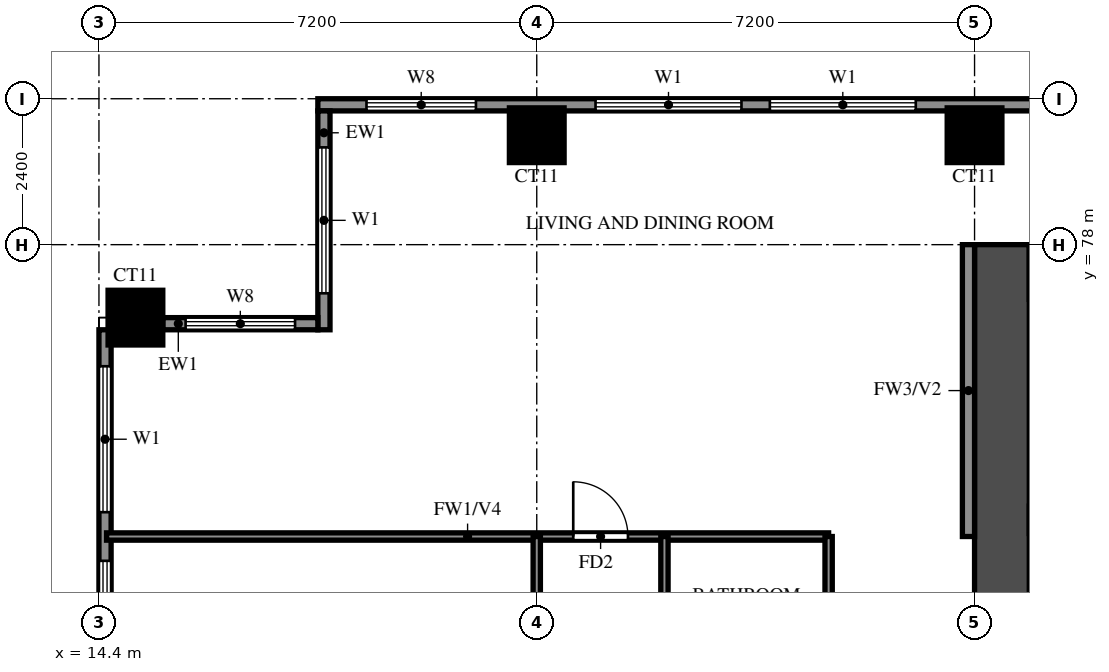
"""IFC4 building model, lengths in metres.
Left out: names, types, materials, properties, quantities, classifications, styles, units other than length and angle.
Written with IfcOpenShell. Run it as: python <this file> out.ifc"""

import sys

from ifc_helpers import new_model, si_unit, direction, frame, frame_2d, origin, origin_2d, place, context, subcontext, project, spatial, rectangle, extrude, source, transform, mapped, element, fill, save


model = new_model("IFC4")
c1 = context("Model", 3, precision=1e-05, world=origin(), true_north=direction((0.0, 1.0)))
c2 = subcontext(c1, "Body", "Model", "MODEL_VIEW")
j1 = project(units=[si_unit("LENGTHUNIT", "METRE"), si_unit("PLANEANGLEUNIT", "RADIAN")], contexts=[c1])
p1 = place(None, origin())
s1 = spatial("IfcSite", under=j1, at=p1, CompositionType="ELEMENT")
p2 = place(p1, origin())
s2 = spatial("IfcBuilding", under=s1, at=p2, CompositionType="ELEMENT")
p3 = place(p2, frame((0.0, 0.0, 93.5)))
s3 = spatial("IfcBuildingStorey", under=s2, at=p3, CompositionType="ELEMENT", Elevation=93.5)
m1 = source(origin(), c2, "Body", "SweptSolid", [
    extrude(rectangle(XDim=0.9, YDim=0.9, at=origin_2d()), origin(), (0.0, 0.0, 1.0), 3.18),
])
for number, where, z_axis, x_axis in (
    (1, (15.0, 76.8, 0.0), (0.0, 0.0, 1.0), (1.0, 0.0, 0.0)),
    (2, (21.6, 79.8, 0.0), (0.0, 0.0, 1.0), (1.0, 0.0, 0.0)),
    (3, (28.8, 79.8, 0.0), (0.0, 0.0, 1.0), (1.0, 0.0, 0.0)),
):
    element("IfcColumn", number, at=place(p3, frame(where, z_axis=z_axis, x_axis=x_axis)), inside=s3, PredefinedType="COLUMN", context=c2, shape_type="MappedRepresentation", body=[
        mapped(m1, transform((0.0, 0.0, 0.0))),
    ])
p4 = place(p3, frame((29.25, 66.0, 0.0), z_axis=(0.0, 0.0, 1.0), x_axis=(0.0, 1.0, 0.0)))
e4 = element("IfcWall", 4, at=p4, inside=s3, PredefinedType="SHEAR", context=c2, shape_type="SweptSolid", body=[
    extrude(rectangle(XDim=12.0, YDim=0.9, at=frame_2d((6.0, 0.0))), origin(), (0.0, 0.0, 1.0), 3.18),
])
p5 = place(p3, frame((29.7, 73.475, 0.0), z_axis=(0.0, 0.0, 1.0), x_axis=(1.0, 0.0, 0.0)))
e5 = element("IfcWall", 5, at=p5, inside=s3, PredefinedType="SHEAR", context=c2, shape_type="SweptSolid", body=[
    extrude(rectangle(XDim=3.175, YDim=0.45, at=frame_2d((1.587, 0.0))), origin(), (0.0, 0.0, 1.0), 3.18),
])
p6 = place(p3, frame((72.0, 80.3, 0.0), z_axis=(0.0, 0.0, 1.0), x_axis=(-1.0, 0.0, 0.0)))
e6 = element("IfcWall", 6, at=p6, inside=s3, PredefinedType="SOLIDWALL", context=c2, shape_type="SweptSolid", body=[
    extrude(rectangle(XDim=54.0, YDim=0.2, at=frame_2d((27.0, 0.0))), origin(), (0.0, 0.0, 1.0), 3.18),
])
p7 = place(p6, frame((44.167, 0.0, 0.6)))
e7 = element("IfcOpeningElement", 7, at=p7, cuts=e6, PredefinedType="OPENING", context=c2, shape_type="SweptSolid", body=[
    extrude(rectangle(XDim=2.4, YDim=2.4, at=frame_2d((1.2, 1.2))), frame((0.0, 0.11, 0.0), z_axis=(0.0, -1.0, 0.0), x_axis=(1.0, 0.0, 0.0)), (0.0, 0.0, 1.0), 0.22),
])
p8 = place(p6, frame((47.033, 0.0, 0.6)))
e8 = element("IfcOpeningElement", 8, at=p8, cuts=e6, PredefinedType="OPENING", context=c2, shape_type="SweptSolid", body=[
    extrude(rectangle(XDim=2.4, YDim=2.4, at=frame_2d((1.2, 1.2))), frame((0.0, 0.11, 0.0), z_axis=(0.0, -1.0, 0.0), x_axis=(1.0, 0.0, 0.0)), (0.0, 0.0, 1.0), 0.22),
])
p9 = place(p6, frame((51.4, 0.0, 0.6)))
e9 = element("IfcOpeningElement", 9, at=p9, cuts=e6, PredefinedType="OPENING", context=c2, shape_type="SweptSolid", body=[
    extrude(rectangle(XDim=1.8, YDim=2.4, at=frame_2d((0.9, 1.2))), frame((0.0, 0.11, 0.0), z_axis=(0.0, -1.0, 0.0), x_axis=(1.0, 0.0, 0.0)), (0.0, 0.0, 1.0), 0.22),
])
p10 = place(p3, frame((18.1, 80.2, 0.0), z_axis=(0.0, 0.0, 1.0), x_axis=(0.0, -1.0, 0.0)))
e10 = element("IfcWall", 10, at=p10, inside=s3, PredefinedType="SOLIDWALL", context=c2, shape_type="SweptSolid", body=[
    extrude(rectangle(XDim=3.6, YDim=0.2, at=frame_2d((1.8, 0.0))), origin(), (0.0, 0.0, 1.0), 3.18),
])
p11 = place(p10, frame((0.6, 0.0, 0.6)))
e11 = element("IfcOpeningElement", 11, at=p11, cuts=e10, PredefinedType="OPENING", context=c2, shape_type="SweptSolid", body=[
    extrude(rectangle(XDim=2.4, YDim=2.4, at=frame_2d((1.2, 1.2))), frame((0.0, 0.11, 0.0), z_axis=(0.0, -1.0, 0.0), x_axis=(1.0, 0.0, 0.0)), (0.0, 0.0, 1.0), 0.22),
])
p12 = place(p3, frame((18.0, 76.7, 0.0), z_axis=(0.0, 0.0, 1.0), x_axis=(-1.0, 0.0, 0.0)))
e12 = element("IfcWall", 12, at=p12, inside=s3, PredefinedType="SOLIDWALL", context=c2, shape_type="SweptSolid", body=[
    extrude(rectangle(XDim=2.55, YDim=0.2, at=frame_2d((1.275, 0.0))), origin(), (0.0, 0.0, 1.0), 3.18),
])
p13 = place(p12, frame((0.375, 0.0, 0.6)))
e13 = element("IfcOpeningElement", 13, at=p13, cuts=e12, PredefinedType="OPENING", context=c2, shape_type="SweptSolid", body=[
    extrude(rectangle(XDim=1.8, YDim=2.4, at=frame_2d((0.9, 1.2))), frame((0.0, 0.11, 0.0), z_axis=(0.0, -1.0, 0.0), x_axis=(1.0, 0.0, 0.0)), (0.0, 0.0, 1.0), 0.22),
])
p14 = place(p3, frame((14.5, 76.6, 0.0), z_axis=(0.0, 0.0, 1.0), x_axis=(0.0, -1.0, 0.0)))
e14 = element("IfcWall", 14, at=p14, inside=s3, PredefinedType="SOLIDWALL", context=c2, shape_type="SweptSolid", body=[
    extrude(rectangle(XDim=39.4, YDim=0.2, at=frame_2d((19.7, 0.0))), origin(), (0.0, 0.0, 1.0), 3.18),
])
p15 = place(p14, frame((15.1, 0.0, 0.0)))
e15 = element("IfcOpeningElement", 15, at=p15, cuts=e14, PredefinedType="OPENING", context=c2, shape_type="SweptSolid", body=[
    extrude(rectangle(XDim=1.8, YDim=2.4, at=frame_2d((0.9, 1.2))), frame((0.0, 0.11, 0.0), z_axis=(0.0, -1.0, 0.0), x_axis=(1.0, 0.0, 0.0)), (0.0, 0.0, 1.0), 0.22),
])
p16 = place(p14, frame((29.5, 0.0, 0.0)))
e16 = element("IfcOpeningElement", 16, at=p16, cuts=e14, PredefinedType="OPENING", context=c2, shape_type="SweptSolid", body=[
    extrude(rectangle(XDim=1.8, YDim=2.4, at=frame_2d((0.9, 1.2))), frame((0.0, 0.11, 0.0), z_axis=(0.0, -1.0, 0.0), x_axis=(1.0, 0.0, 0.0)), (0.0, 0.0, 1.0), 0.22),
])
p17 = place(p14, frame((31.75, 0.0, 0.6)))
e17 = element("IfcOpeningElement", 17, at=p17, cuts=e14, PredefinedType="OPENING", context=c2, shape_type="SweptSolid", body=[
    extrude(rectangle(XDim=0.9, YDim=2.4, at=frame_2d((0.45, 1.2))), frame((0.0, 0.11, 0.0), z_axis=(0.0, -1.0, 0.0), x_axis=(1.0, 0.0, 0.0)), (0.0, 0.0, 1.0), 0.22),
])
p18 = place(p14, frame((33.8, 0.0, 0.6)))
e18 = element("IfcOpeningElement", 18, at=p18, cuts=e14, PredefinedType="OPENING", context=c2, shape_type="SweptSolid", body=[
    extrude(rectangle(XDim=1.2, YDim=2.4, at=frame_2d((0.6, 1.2))), frame((0.0, 0.11, 0.0), z_axis=(0.0, -1.0, 0.0), x_axis=(1.0, 0.0, 0.0)), (0.0, 0.0, 1.0), 0.22),
])
p19 = place(p14, frame((36.8, 0.0, 0.6)))
e19 = element("IfcOpeningElement", 19, at=p19, cuts=e14, PredefinedType="OPENING", context=c2, shape_type="SweptSolid", body=[
    extrude(rectangle(XDim=1.8, YDim=2.4, at=frame_2d((0.9, 1.2))), frame((0.0, 0.11, 0.0), z_axis=(0.0, -1.0, 0.0), x_axis=(1.0, 0.0, 0.0)), (0.0, 0.0, 1.0), 0.22),
])
p20 = place(p14, frame((22.8, 0.0, 0.6)))
e20 = element("IfcOpeningElement", 20, at=p20, cuts=e14, PredefinedType="OPENING", context=c2, shape_type="SweptSolid", body=[
    extrude(rectangle(XDim=2.4, YDim=2.4, at=frame_2d((1.2, 1.2))), frame((0.0, 0.11, 0.0), z_axis=(0.0, -1.0, 0.0), x_axis=(1.0, 0.0, 0.0)), (0.0, 0.0, 1.0), 0.22),
])
p21 = place(p14, frame((27.05, 0.0, 0.6)))
e21 = element("IfcOpeningElement", 21, at=p21, cuts=e14, PredefinedType="OPENING", context=c2, shape_type="SweptSolid", body=[
    extrude(rectangle(XDim=0.9, YDim=2.4, at=frame_2d((0.45, 1.2))), frame((0.0, 0.11, 0.0), z_axis=(0.0, -1.0, 0.0), x_axis=(1.0, 0.0, 0.0)), (0.0, 0.0, 1.0), 0.22),
])
p22 = place(p14, frame((19.1, 0.0, 0.6)))
e22 = element("IfcOpeningElement", 22, at=p22, cuts=e14, PredefinedType="OPENING", context=c2, shape_type="SweptSolid", body=[
    extrude(rectangle(XDim=1.8, YDim=2.4, at=frame_2d((0.9, 1.2))), frame((0.0, 0.11, 0.0), z_axis=(0.0, -1.0, 0.0), x_axis=(1.0, 0.0, 0.0)), (0.0, 0.0, 1.0), 0.22),
])
p23 = place(p14, frame((10.75, 0.0, 1.5)))
e23 = element("IfcOpeningElement", 23, at=p23, cuts=e14, PredefinedType="OPENING", context=c2, shape_type="SweptSolid", body=[
    extrude(rectangle(XDim=0.9, YDim=0.9, at=frame_2d((0.45, 0.45))), frame((0.0, 0.11, 0.0), z_axis=(0.0, -1.0, 0.0), x_axis=(1.0, 0.0, 0.0)), (0.0, 0.0, 1.0), 0.22),
])
p24 = place(p14, frame((12.65, 0.0, 1.5)))
e24 = element("IfcOpeningElement", 24, at=p24, cuts=e14, PredefinedType="OPENING", context=c2, shape_type="SweptSolid", body=[
    extrude(rectangle(XDim=0.9, YDim=0.9, at=frame_2d((0.45, 0.45))), frame((0.0, 0.11, 0.0), z_axis=(0.0, -1.0, 0.0), x_axis=(1.0, 0.0, 0.0)), (0.0, 0.0, 1.0), 0.22),
])
p25 = place(p14, frame((7.8, 0.0, 0.6)))
e25 = element("IfcOpeningElement", 25, at=p25, cuts=e14, PredefinedType="OPENING", context=c2, shape_type="SweptSolid", body=[
    extrude(rectangle(XDim=2.4, YDim=2.4, at=frame_2d((1.2, 1.2))), frame((0.0, 0.11, 0.0), z_axis=(0.0, -1.0, 0.0), x_axis=(1.0, 0.0, 0.0)), (0.0, 0.0, 1.0), 0.22),
])
p26 = place(p14, frame((3.8, 0.0, 0.6)))
e26 = element("IfcOpeningElement", 26, at=p26, cuts=e14, PredefinedType="OPENING", context=c2, shape_type="SweptSolid", body=[
    extrude(rectangle(XDim=2.4, YDim=2.4, at=frame_2d((1.2, 1.2))), frame((0.0, 0.11, 0.0), z_axis=(0.0, -1.0, 0.0), x_axis=(1.0, 0.0, 0.0)), (0.0, 0.0, 1.0), 0.22),
])
p27 = place(p14, frame((0.6, 0.0, 0.6)))
e27 = element("IfcOpeningElement", 27, at=p27, cuts=e14, PredefinedType="OPENING", context=c2, shape_type="SweptSolid", body=[
    extrude(rectangle(XDim=2.4, YDim=2.4, at=frame_2d((1.2, 1.2))), frame((0.0, 0.11, 0.0), z_axis=(0.0, -1.0, 0.0), x_axis=(1.0, 0.0, 0.0)), (0.0, 0.0, 1.0), 0.22),
])
p28 = place(p3, frame((28.7, 73.2, 0.0), z_axis=(0.0, 0.0, 1.0), x_axis=(0.0, 1.0, 0.0)))
e28 = element("IfcWall", 28, at=p28, inside=s3, PredefinedType="SOLIDWALL", context=c2, shape_type="SweptSolid", body=[
    extrude(rectangle(XDim=4.8, YDim=0.2, at=frame_2d((2.4, 0.0))), origin(), (0.0, 0.0, 1.0), 3.18),
])
p29 = place(p3, frame((14.525, 73.2, 0.0), z_axis=(0.0, 0.0, 1.0), x_axis=(1.0, 0.0, 0.0)))
e29 = element("IfcWall", 29, at=p29, inside=s3, PredefinedType="PARTITIONING", context=c2, shape_type="SweptSolid", body=[
    extrude(rectangle(XDim=11.875, YDim=0.12, at=frame_2d((5.938, 0.0))), origin(), (0.0, 0.0, 1.0), 2.28),
])
p30 = place(p29, frame((7.675, 0.0, 0.0)))
e30 = element("IfcOpeningElement", 30, at=p30, cuts=e29, PredefinedType="OPENING", context=c2, shape_type="SweptSolid", body=[
    extrude(rectangle(XDim=0.9, YDim=2.1, at=frame_2d((0.45, 1.05))), frame((0.0, 0.07, 0.0), z_axis=(0.0, -1.0, 0.0), x_axis=(1.0, 0.0, 0.0)), (0.0, 0.0, 1.0), 0.14),
])
p31 = place(p3, frame((21.6, 66.0, 0.0), z_axis=(0.0, 0.0, 1.0), x_axis=(0.0, 1.0, 0.0)))
e31 = element("IfcWall", 31, at=p31, inside=s3, PredefinedType="PARTITIONING", context=c2, shape_type="SweptSolid", body=[
    extrude(rectangle(XDim=7.2, YDim=0.12, at=frame_2d((3.6, 0.0))), origin(), (0.0, 0.0, 1.0), 3.18),
])
p32 = place(p31, frame((1.35, 0.0, 0.0)))
e32 = element("IfcOpeningElement", 32, at=p32, cuts=e31, PredefinedType="OPENING", context=c2, shape_type="SweptSolid", body=[
    extrude(rectangle(XDim=0.9, YDim=2.1, at=frame_2d((0.45, 1.05))), frame((0.0, 0.07, 0.0), z_axis=(0.0, -1.0, 0.0), x_axis=(1.0, 0.0, 0.0)), (0.0, 0.0, 1.0), 0.14),
])
p33 = place(p31, frame((4.95, 0.0, 0.0)))
e33 = element("IfcOpeningElement", 33, at=p33, cuts=e31, PredefinedType="OPENING", context=c2, shape_type="SweptSolid", body=[
    extrude(rectangle(XDim=0.9, YDim=2.1, at=frame_2d((0.45, 1.05))), frame((0.0, 0.07, 0.0), z_axis=(0.0, -1.0, 0.0), x_axis=(1.0, 0.0, 0.0)), (0.0, 0.0, 1.0), 0.14),
])
p34 = place(p3, frame((23.7, 61.2, 0.0), z_axis=(0.0, 0.0, 1.0), x_axis=(0.0, 1.0, 0.0)))
e34 = element("IfcWall", 34, at=p34, inside=s3, PredefinedType="PARTITIONING", context=c2, shape_type="SweptSolid", body=[
    extrude(rectangle(XDim=12.0, YDim=0.12, at=frame_2d((6.0, 0.0))), origin(), (0.0, 0.0, 1.0), 3.18),
])
p35 = place(p34, frame((1.875, 0.0, 0.0)))
e35 = element("IfcOpeningElement", 35, at=p35, cuts=e34, PredefinedType="OPENING", context=c2, shape_type="SweptSolid", body=[
    extrude(rectangle(XDim=0.9, YDim=2.1, at=frame_2d((0.45, 1.05))), frame((0.0, 0.07, 0.0), z_axis=(0.0, -1.0, 0.0), x_axis=(1.0, 0.0, 0.0)), (0.0, 0.0, 1.0), 0.14),
])
p36 = place(p34, frame((5.875, 0.0, 0.0)))
e36 = element("IfcOpeningElement", 36, at=p36, cuts=e34, PredefinedType="OPENING", context=c2, shape_type="SweptSolid", body=[
    extrude(rectangle(XDim=0.9, YDim=2.1, at=frame_2d((0.45, 1.05))), frame((0.0, 0.07, 0.0), z_axis=(0.0, -1.0, 0.0), x_axis=(1.0, 0.0, 0.0)), (0.0, 0.0, 1.0), 0.14),
])
p37 = place(p34, frame((9.6, 0.0, 0.0)))
e37 = element("IfcOpeningElement", 37, at=p37, cuts=e34, PredefinedType="OPENING", context=c2, shape_type="SweptSolid", body=[
    extrude(rectangle(XDim=0.8, YDim=2.1, at=frame_2d((0.4, 1.05))), frame((0.0, 0.07, 0.0), z_axis=(0.0, -1.0, 0.0), x_axis=(1.0, 0.0, 0.0)), (0.0, 0.0, 1.0), 0.14),
])
p38 = place(p3, frame((26.4, 69.2, 0.0), z_axis=(0.0, 0.0, 1.0), x_axis=(0.0, 1.0, 0.0)))
e38 = element("IfcWall", 38, at=p38, inside=s3, PredefinedType="PARTITIONING", context=c2, shape_type="SweptSolid", body=[
    extrude(rectangle(XDim=4.0, YDim=0.12, at=frame_2d((2.0, 0.0))), origin(), (0.0, 0.0, 1.0), 3.18),
])
p39 = place(p7, origin())
e39 = element("IfcWindow", 39, at=p39, inside=s3, PartitioningType="DOUBLE_PANEL_VERTICAL", PredefinedType="WINDOW", context=c2, shape_type="SweptSolid", body=[
    extrude(rectangle(XDim=2.4, YDim=2.4, at=frame_2d((1.2, 1.2))), frame((0.0, 0.03, 0.0), z_axis=(0.0, -1.0, 0.0), x_axis=(1.0, 0.0, 0.0)), (0.0, 0.0, 1.0), 0.06),
])
fill(e7, e39)
p40 = place(p8, origin())
e40 = element("IfcWindow", 40, at=p40, inside=s3, PartitioningType="DOUBLE_PANEL_VERTICAL", PredefinedType="WINDOW", context=c2, shape_type="SweptSolid", body=[
    extrude(rectangle(XDim=2.4, YDim=2.4, at=frame_2d((1.2, 1.2))), frame((0.0, 0.03, 0.0), z_axis=(0.0, -1.0, 0.0), x_axis=(1.0, 0.0, 0.0)), (0.0, 0.0, 1.0), 0.06),
])
fill(e8, e40)
p41 = place(p9, origin())
e41 = element("IfcWindow", 41, at=p41, inside=s3, PartitioningType="DOUBLE_PANEL_VERTICAL", PredefinedType="WINDOW", context=c2, shape_type="SweptSolid", body=[
    extrude(rectangle(XDim=1.8, YDim=2.4, at=frame_2d((0.9, 1.2))), frame((0.0, 0.03, 0.0), z_axis=(0.0, -1.0, 0.0), x_axis=(1.0, 0.0, 0.0)), (0.0, 0.0, 1.0), 0.06),
])
fill(e9, e41)
p42 = place(p11, origin())
e42 = element("IfcWindow", 42, at=p42, inside=s3, PartitioningType="DOUBLE_PANEL_VERTICAL", PredefinedType="WINDOW", context=c2, shape_type="SweptSolid", body=[
    extrude(rectangle(XDim=2.4, YDim=2.4, at=frame_2d((1.2, 1.2))), frame((0.0, 0.03, 0.0), z_axis=(0.0, -1.0, 0.0), x_axis=(1.0, 0.0, 0.0)), (0.0, 0.0, 1.0), 0.06),
])
fill(e11, e42)
p43 = place(p13, origin())
e43 = element("IfcWindow", 43, at=p43, inside=s3, PartitioningType="DOUBLE_PANEL_VERTICAL", PredefinedType="WINDOW", context=c2, shape_type="SweptSolid", body=[
    extrude(rectangle(XDim=1.8, YDim=2.4, at=frame_2d((0.9, 1.2))), frame((0.0, 0.03, 0.0), z_axis=(0.0, -1.0, 0.0), x_axis=(1.0, 0.0, 0.0)), (0.0, 0.0, 1.0), 0.06),
])
fill(e13, e43)
p44 = place(p26, origin())
e44 = element("IfcWindow", 44, at=p44, inside=s3, PartitioningType="DOUBLE_PANEL_VERTICAL", PredefinedType="WINDOW", context=c2, shape_type="SweptSolid", body=[
    extrude(rectangle(XDim=2.4, YDim=2.4, at=frame_2d((1.2, 1.2))), frame((0.0, 0.03, 0.0), z_axis=(0.0, -1.0, 0.0), x_axis=(1.0, 0.0, 0.0)), (0.0, 0.0, 1.0), 0.06),
])
fill(e26, e44)
p45 = place(p27, origin())
e45 = element("IfcWindow", 45, at=p45, inside=s3, PartitioningType="DOUBLE_PANEL_VERTICAL", PredefinedType="WINDOW", context=c2, shape_type="SweptSolid", body=[
    extrude(rectangle(XDim=2.4, YDim=2.4, at=frame_2d((1.2, 1.2))), frame((0.0, 0.03, 0.0), z_axis=(0.0, -1.0, 0.0), x_axis=(1.0, 0.0, 0.0)), (0.0, 0.0, 1.0), 0.06),
])
fill(e27, e45)
p46 = place(p30, origin())
e46 = element("IfcDoor", 46, at=p46, inside=s3, OperationType="SINGLE_SWING_RIGHT", PredefinedType="DOOR", context=c2, shape_type="SweptSolid", body=[
    extrude(rectangle(XDim=0.9, YDim=2.1, at=frame_2d((0.45, 1.05))), frame((0.0, 0.025, 0.0), z_axis=(0.0, -1.0, 0.0), x_axis=(1.0, 0.0, 0.0)), (0.0, 0.0, 1.0), 0.05),
])
fill(e30, e46)
save(model, sys.argv[1])
